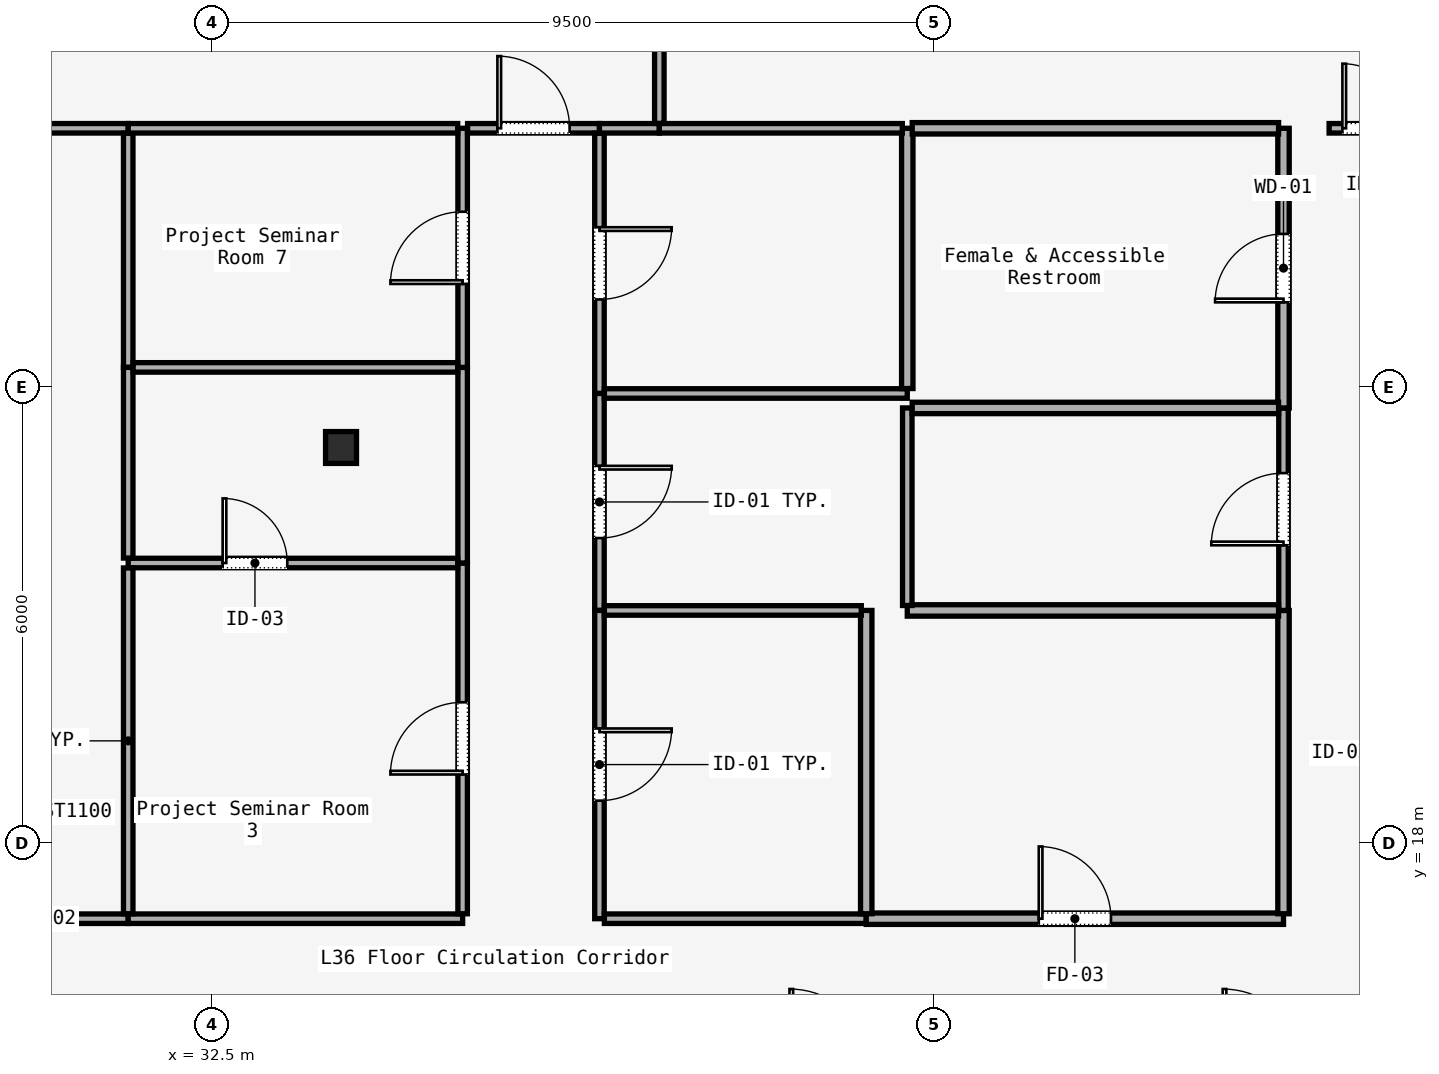
"""IFC4 building model, lengths in metres.
Left out: names, types, materials, properties, quantities, classifications, styles, units other than length and angle.
Written with IfcOpenShell. Run it as: python <this file> out.ifc"""

import sys

from ifc_helpers import new_model, si_unit, direction, frame, frame_2d, origin, origin_2d, place, context, subcontext, project, spatial, rectangle, i_section, extrude, element, fill, save


model = new_model("IFC4")
c1 = context("Model", 3, precision=1e-05, world=origin(), true_north=direction((0.0, 1.0)))
c2 = subcontext(c1, "Body", "Model", "MODEL_VIEW")
j1 = project(units=[si_unit("LENGTHUNIT", "METRE"), si_unit("PLANEANGLEUNIT", "RADIAN")], contexts=[c1])
p1 = place(None, origin())
s1 = spatial("IfcSite", under=j1, at=p1, CompositionType="ELEMENT")
p2 = place(p1, origin())
s2 = spatial("IfcBuilding", under=s1, at=p2, CompositionType="ELEMENT")
p3 = place(p2, frame((0.0, 0.0, 153.6)))
s3 = spatial("IfcBuildingStorey", under=s2, at=p3, CompositionType="ELEMENT", Elevation=153.6)
p4 = place(p3, frame((34.2, 23.2, 0.0), z_axis=(0.0, 0.0, 1.0), x_axis=(1.0, 0.0, 0.0)))
e1 = element("IfcColumn", 1, at=p4, inside=s3, PredefinedType="COLUMN", context=c2, shape_type="SweptSolid", body=[
    extrude(i_section(OverallWidth=0.407, OverallDepth=0.419, WebThickness=0.031, FlangeThickness=0.049, FilletRadius=0.015, at=origin_2d()), origin(), (0.0, 0.0, 1.0), 3.58),
])
p5 = place(p3, frame((25.665, 17.0, 0.0), z_axis=(0.0, 0.0, 1.0), x_axis=(1.0, 0.0, 0.0)))
e2 = element("IfcWall", 2, at=p5, inside=s3, PredefinedType="PARTITIONING", context=c2, shape_type="SweptSolid", body=[
    extrude(rectangle(XDim=5.735, YDim=0.125, at=frame_2d((2.867, 0.0))), origin(), (0.0, 0.0, 1.0), 3.01),
])
p6 = place(p5, frame((2.167, 0.0, 0.0)))
e3 = element("IfcOpeningElement", 3, at=p6, cuts=e2, PredefinedType="OPENING", context=c2, shape_type="SweptSolid", body=[
    extrude(rectangle(XDim=1.4, YDim=2.2, at=frame_2d((0.7, 1.1))), frame((0.0, 0.062, 0.0), z_axis=(0.0, -1.0, 0.0), x_axis=(1.0, 0.0, 0.0)), (0.0, 0.0, 1.0), 0.125),
])
p7 = place(p3, frame((31.4, 17.0, 0.0), z_axis=(0.0, 0.0, 1.0), x_axis=(1.0, 0.0, 0.0)))
e4 = element("IfcWall", 4, at=p7, inside=s3, PredefinedType="PARTITIONING", context=c2, shape_type="SweptSolid", body=[
    extrude(rectangle(XDim=4.4, YDim=0.125, at=frame_2d((2.2, 0.0))), origin(), (0.0, 0.0, 1.0), 3.01),
])
p8 = place(p3, frame((35.8, 17.065, 0.0), z_axis=(0.0, 0.0, 1.0), x_axis=(0.0, 1.0, 0.0)))
e5 = element("IfcWall", 5, at=p8, inside=s3, PredefinedType="PARTITIONING", context=c2, shape_type="SweptSolid", body=[
    extrude(rectangle(XDim=4.615, YDim=0.125, at=frame_2d((2.308, 0.0))), origin(), (0.0, 0.0, 1.0), 3.01),
])
p9 = place(p8, frame((1.833, 0.0, 0.0)))
e6 = element("IfcOpeningElement", 6, at=p9, cuts=e5, PredefinedType="OPENING", context=c2, shape_type="SweptSolid", body=[
    extrude(rectangle(XDim=0.95, YDim=2.2, at=frame_2d((0.475, 1.1))), frame((0.0, 0.062, 0.0), z_axis=(0.0, -1.0, 0.0), x_axis=(1.0, 0.0, 0.0)), (0.0, 0.0, 1.0), 0.125),
])
p10 = place(p3, frame((35.8, 21.68, 0.0), z_axis=(0.0, 0.0, 1.0), x_axis=(0.0, 1.0, 0.0)))
e7 = element("IfcWall", 7, at=p10, inside=s3, PredefinedType="PARTITIONING", context=c2, shape_type="SweptSolid", body=[
    extrude(rectangle(XDim=2.574, YDim=0.125, at=frame_2d((1.287, 0.0))), origin(), (0.0, 0.0, 1.0), 3.01),
])
p11 = place(p3, frame((35.8, 24.254, 0.0), z_axis=(0.0, 0.0, 1.0), x_axis=(0.0, 1.0, 0.0)))
e8 = element("IfcWall", 8, at=p11, inside=s3, PredefinedType="PARTITIONING", context=c2, shape_type="SweptSolid", body=[
    extrude(rectangle(XDim=3.146, YDim=0.125, at=frame_2d((1.573, 0.0))), origin(), (0.0, 0.0, 1.0), 3.01),
])
p12 = place(p11, frame((1.098, 0.0, 0.0)))
e9 = element("IfcOpeningElement", 9, at=p12, cuts=e8, PredefinedType="OPENING", context=c2, shape_type="SweptSolid", body=[
    extrude(rectangle(XDim=0.95, YDim=2.2, at=frame_2d((0.475, 1.1))), frame((0.0, 0.062, 0.0), z_axis=(0.0, -1.0, 0.0), x_axis=(1.0, 0.0, 0.0)), (0.0, 0.0, 1.0), 0.125),
])
p13 = place(p3, frame((35.865, 27.4, 0.0), z_axis=(0.0, 0.0, 1.0), x_axis=(1.0, 0.0, 0.0)))
e10 = element("IfcWall", 10, at=p13, inside=s3, PredefinedType="PARTITIONING", context=c2, shape_type="SweptSolid", body=[
    extrude(rectangle(XDim=1.735, YDim=0.125, at=frame_2d((0.868, 0.0))), origin(), (0.0, 0.0, 1.0), 3.01),
])
p14 = place(p13, frame((0.393, 0.0, 0.0)))
e11 = element("IfcOpeningElement", 11, at=p14, cuts=e10, PredefinedType="OPENING", context=c2, shape_type="SweptSolid", body=[
    extrude(rectangle(XDim=0.95, YDim=2.2, at=frame_2d((0.475, 1.1))), frame((0.0, 0.062, 0.0), z_axis=(0.0, -1.0, 0.0), x_axis=(1.0, 0.0, 0.0)), (0.0, 0.0, 1.0), 0.125),
])
p15 = place(p3, frame((37.6, 27.335, 0.0), z_axis=(0.0, 0.0, 1.0), x_axis=(0.0, -1.0, 0.0)))
e12 = element("IfcWall", 12, at=p15, inside=s3, PredefinedType="PARTITIONING", context=c2, shape_type="SweptSolid", body=[
    extrude(rectangle(XDim=3.424, YDim=0.125, at=frame_2d((1.712, 0.0))), origin(), (0.0, 0.0, 1.0), 3.01),
])
p16 = place(p15, frame((1.237, 0.0, 0.0)))
e13 = element("IfcOpeningElement", 13, at=p16, cuts=e12, PredefinedType="OPENING", context=c2, shape_type="SweptSolid", body=[
    extrude(rectangle(XDim=0.95, YDim=2.2, at=frame_2d((0.475, 1.1))), frame((0.0, 0.062, 0.0), z_axis=(0.0, -1.0, 0.0), x_axis=(1.0, 0.0, 0.0)), (0.0, 0.0, 1.0), 0.125),
])
p17 = place(p3, frame((37.6, 23.911, 0.0), z_axis=(0.0, 0.0, 1.0), x_axis=(0.0, -1.0, 0.0)))
e14 = element("IfcWall", 14, at=p17, inside=s3, PredefinedType="PARTITIONING", context=c2, shape_type="SweptSolid", body=[
    extrude(rectangle(XDim=2.855, YDim=0.125, at=frame_2d((1.427, 0.0))), origin(), (0.0, 0.0, 1.0), 3.01),
])
p18 = place(p17, frame((0.952, 0.0, 0.0)))
e15 = element("IfcOpeningElement", 15, at=p18, cuts=e14, PredefinedType="OPENING", context=c2, shape_type="SweptSolid", body=[
    extrude(rectangle(XDim=0.95, YDim=2.2, at=frame_2d((0.475, 1.1))), frame((0.0, 0.062, 0.0), z_axis=(0.0, -1.0, 0.0), x_axis=(1.0, 0.0, 0.0)), (0.0, 0.0, 1.0), 0.125),
])
p19 = place(p3, frame((37.6, 21.056, 0.0), z_axis=(0.0, 0.0, 1.0), x_axis=(0.0, -1.0, 0.0)))
e16 = element("IfcWall", 16, at=p19, inside=s3, PredefinedType="PARTITIONING", context=c2, shape_type="SweptSolid", body=[
    extrude(rectangle(XDim=4.056, YDim=0.125, at=frame_2d((2.028, 0.0))), origin(), (0.0, 0.0, 1.0), 3.01),
])
p20 = place(p19, frame((1.553, 0.0, 0.0)))
e17 = element("IfcOpeningElement", 17, at=p20, cuts=e16, PredefinedType="OPENING", context=c2, shape_type="SweptSolid", body=[
    extrude(rectangle(XDim=0.95, YDim=2.2, at=frame_2d((0.475, 1.1))), frame((0.0, 0.062, 0.0), z_axis=(0.0, -1.0, 0.0), x_axis=(1.0, 0.0, 0.0)), (0.0, 0.0, 1.0), 0.125),
])
p21 = place(p3, frame((37.665, 17.0, 0.0), z_axis=(0.0, 0.0, 1.0), x_axis=(1.0, 0.0, 0.0)))
e18 = element("IfcWall", 18, at=p21, inside=s3, PredefinedType="PARTITIONING", context=c2, shape_type="SweptSolid", body=[
    extrude(rectangle(XDim=3.445, YDim=0.125, at=frame_2d((1.723, 0.0))), origin(), (0.0, 0.0, 1.0), 3.01),
])
p22 = place(p3, frame((41.11, 17.0, 0.0), z_axis=(0.0, 0.0, 1.0), x_axis=(1.0, 0.0, 0.0)))
e19 = element("IfcWall", 19, at=p22, inside=s3, PredefinedType="PARTITIONING", context=c2, shape_type="SweptSolid", body=[
    extrude(rectangle(XDim=5.49, YDim=0.15, at=frame_2d((2.745, 0.0))), origin(), (0.0, 0.0, 1.0), 3.01),
])
p23 = place(p22, frame((2.27, 0.0, 0.0)))
e20 = element("IfcOpeningElement", 20, at=p23, cuts=e19, PredefinedType="OPENING", context=c2, shape_type="SweptSolid", body=[
    extrude(rectangle(XDim=0.95, YDim=2.2, at=frame_2d((0.475, 1.1))), frame((0.0, 0.075, 0.0), z_axis=(0.0, -1.0, 0.0), x_axis=(1.0, 0.0, 0.0)), (0.0, 0.0, 1.0), 0.15),
])
p24 = place(p3, frame((46.6, 17.065, 0.0), z_axis=(0.0, 0.0, 1.0), x_axis=(0.0, 1.0, 0.0)))
e21 = element("IfcWall", 21, at=p24, inside=s3, PredefinedType="PARTITIONING", context=c2, shape_type="SweptSolid", body=[
    extrude(rectangle(XDim=3.991, YDim=0.15, at=frame_2d((1.996, 0.0))), origin(), (0.0, 0.0, 1.0), 3.01),
])
p25 = place(p3, frame((46.6, 21.056, 0.0), z_axis=(0.0, 0.0, 1.0), x_axis=(0.0, 1.0, 0.0)))
e22 = element("IfcWall", 22, at=p25, inside=s3, PredefinedType="PARTITIONING", context=c2, shape_type="SweptSolid", body=[
    extrude(rectangle(XDim=2.665, YDim=0.125, at=frame_2d((1.332, 0.0))), origin(), (0.0, 0.0, 1.0), 3.01),
])
p26 = place(p25, frame((0.857, 0.0, 0.0)))
e23 = element("IfcOpeningElement", 23, at=p26, cuts=e22, PredefinedType="OPENING", context=c2, shape_type="SweptSolid", body=[
    extrude(rectangle(XDim=0.95, YDim=2.2, at=frame_2d((0.475, 1.1))), frame((0.0, 0.062, 0.0), z_axis=(0.0, -1.0, 0.0), x_axis=(1.0, 0.0, 0.0)), (0.0, 0.0, 1.0), 0.125),
])
p27 = place(p3, frame((46.6, 23.72, 0.0), z_axis=(0.0, 0.0, 1.0), x_axis=(0.0, 1.0, 0.0)))
e24 = element("IfcWall", 24, at=p27, inside=s3, PredefinedType="PARTITIONING", context=c2, shape_type="SweptSolid", body=[
    extrude(rectangle(XDim=3.679, YDim=0.15, at=frame_2d((1.84, 0.0))), origin(), (0.0, 0.0, 1.0), 3.01),
])
p28 = place(p27, frame((1.39, 0.0, 0.0)))
e25 = element("IfcOpeningElement", 25, at=p28, cuts=e24, PredefinedType="OPENING", context=c2, shape_type="SweptSolid", body=[
    extrude(rectangle(XDim=0.9, YDim=2.15, at=frame_2d((0.45, 1.075))), frame((0.0, 0.075, 0.0), z_axis=(0.0, -1.0, 0.0), x_axis=(1.0, 0.0, 0.0)), (0.0, 0.0, 1.0), 0.15),
])
p29 = place(p3, frame((47.2, 27.4, 0.0), z_axis=(0.0, 0.0, 1.0), x_axis=(1.0, 0.0, 0.0)))
e26 = element("IfcWall", 26, at=p29, inside=s3, PredefinedType="PARTITIONING", context=c2, shape_type="SweptSolid", body=[
    extrude(rectangle(XDim=1.2, YDim=0.125, at=frame_2d((0.6, 0.0))), origin(), (0.0, 0.0, 1.0), 3.01),
])
p30 = place(p29, frame((0.175, 0.0, 0.0)))
e27 = element("IfcOpeningElement", 27, at=p30, cuts=e26, PredefinedType="OPENING", context=c2, shape_type="SweptSolid", body=[
    extrude(rectangle(XDim=0.85, YDim=2.15, at=frame_2d((0.425, 1.075))), frame((0.0, 0.062, 0.0), z_axis=(0.0, -1.0, 0.0), x_axis=(1.0, 0.0, 0.0)), (0.0, 0.0, 1.0), 0.125),
])
p31 = place(p3, frame((41.11, 21.056, 0.0), z_axis=(0.0, 0.0, 1.0), x_axis=(0.0, -1.0, 0.0)))
e28 = element("IfcWall", 28, at=p31, inside=s3, PredefinedType="PARTITIONING", context=c2, shape_type="SweptSolid", body=[
    extrude(rectangle(XDim=3.991, YDim=0.15, at=frame_2d((1.996, 0.0))), origin(), (0.0, 0.0, 1.0), 3.01),
])
p32 = place(p3, frame((37.665, 21.056, 0.0), z_axis=(0.0, 0.0, 1.0), x_axis=(1.0, 0.0, 0.0)))
e29 = element("IfcWall", 29, at=p32, inside=s3, PredefinedType="PARTITIONING", context=c2, shape_type="SweptSolid", body=[
    extrude(rectangle(XDim=3.38, YDim=0.125, at=frame_2d((1.69, 0.0))), origin(), (0.0, 0.0, 1.0), 3.01),
])
p33 = place(p3, frame((41.65, 21.056, 0.0), z_axis=(0.0, 0.0, 1.0), x_axis=(1.0, 0.0, 0.0)))
e30 = element("IfcWall", 30, at=p33, inside=s3, PredefinedType="PARTITIONING", context=c2, shape_type="SweptSolid", body=[
    extrude(rectangle(XDim=4.885, YDim=0.15, at=frame_2d((2.442, 0.0))), origin(), (0.0, 0.0, 1.0), 3.01),
])
p34 = place(p3, frame((31.4, 21.68, 0.0), z_axis=(0.0, 0.0, 1.0), x_axis=(1.0, 0.0, 0.0)))
e31 = element("IfcWall", 31, at=p34, inside=s3, PredefinedType="PARTITIONING", context=c2, shape_type="SweptSolid", body=[
    extrude(rectangle(XDim=4.335, YDim=0.125, at=frame_2d((2.167, 0.0))), origin(), (0.0, 0.0, 1.0), 3.01),
])
p35 = place(p34, frame((1.242, 0.0, 0.0)))
e32 = element("IfcOpeningElement", 32, at=p35, cuts=e31, PredefinedType="OPENING", context=c2, shape_type="SweptSolid", body=[
    extrude(rectangle(XDim=0.85, YDim=2.15, at=frame_2d((0.425, 1.075))), frame((0.0, 0.062, 0.0), z_axis=(0.0, -1.0, 0.0), x_axis=(1.0, 0.0, 0.0)), (0.0, 0.0, 1.0), 0.125),
])
p36 = place(p3, frame((31.4, 17.065, 0.0), z_axis=(0.0, 0.0, 1.0), x_axis=(0.0, 1.0, 0.0)))
e33 = element("IfcWall", 33, at=p36, inside=s3, PredefinedType="PARTITIONING", context=c2, shape_type="SweptSolid", body=[
    extrude(rectangle(XDim=4.55, YDim=0.125, at=frame_2d((2.275, 0.0))), origin(), (0.0, 0.0, 1.0), 3.01),
])
p37 = place(p3, frame((25.581, 27.4, 0.0), z_axis=(0.0, 0.0, 1.0), x_axis=(1.0, 0.0, 0.0)))
e34 = element("IfcWall", 34, at=p37, inside=s3, PredefinedType="PARTITIONING", context=c2, shape_type="SweptSolid", body=[
    extrude(rectangle(XDim=5.819, YDim=0.125, at=frame_2d((2.91, 0.0))), origin(), (0.0, 0.0, 1.0), 3.01),
])
p38 = place(p3, frame((31.4, 27.335, 0.0), z_axis=(0.0, 0.0, 1.0), x_axis=(0.0, -1.0, 0.0)))
e35 = element("IfcWall", 35, at=p38, inside=s3, PredefinedType="PARTITIONING", context=c2, shape_type="SweptSolid", body=[
    extrude(rectangle(XDim=3.081, YDim=0.125, at=frame_2d((1.541, 0.0))), origin(), (0.0, 0.0, 1.0), 3.01),
])
p39 = place(p3, frame((31.4, 24.254, 0.0), z_axis=(0.0, 0.0, 1.0), x_axis=(0.0, -1.0, 0.0)))
e36 = element("IfcWall", 36, at=p39, inside=s3, PredefinedType="PARTITIONING", context=c2, shape_type="SweptSolid", body=[
    extrude(rectangle(XDim=2.509, YDim=0.125, at=frame_2d((1.254, 0.0))), origin(), (0.0, 0.0, 1.0), 3.01),
])
p40 = place(p3, frame((41.65, 21.121, 0.0), z_axis=(0.0, 0.0, 1.0), x_axis=(0.0, 1.0, 0.0)))
e37 = element("IfcWall", 37, at=p40, inside=s3, PredefinedType="PARTITIONING", context=c2, shape_type="SweptSolid", body=[
    extrude(rectangle(XDim=2.599, YDim=0.125, at=frame_2d((1.3, 0.0))), origin(), (0.0, 0.0, 1.0), 3.01),
])
p41 = place(p3, frame((41.715, 23.72, 0.0), z_axis=(0.0, 0.0, 1.0), x_axis=(1.0, 0.0, 0.0)))
e38 = element("IfcWall", 38, at=p41, inside=s3, PredefinedType="PARTITIONING", context=c2, shape_type="SweptSolid", body=[
    extrude(rectangle(XDim=4.82, YDim=0.15, at=frame_2d((2.41, 0.0))), origin(), (0.0, 0.0, 1.0), 3.01),
])
p42 = place(p3, frame((37.665, 23.911, 0.0), z_axis=(0.0, 0.0, 1.0), x_axis=(1.0, 0.0, 0.0)))
e39 = element("IfcWall", 39, at=p42, inside=s3, PredefinedType="PARTITIONING", context=c2, shape_type="SweptSolid", body=[
    extrude(rectangle(XDim=3.985, YDim=0.125, at=frame_2d((1.992, 0.0))), origin(), (0.0, 0.0, 1.0), 3.01),
])
p43 = place(p3, frame((31.465, 24.254, 0.0), z_axis=(0.0, 0.0, 1.0), x_axis=(1.0, 0.0, 0.0)))
e40 = element("IfcWall", 40, at=p43, inside=s3, PredefinedType="PARTITIONING", context=c2, shape_type="SweptSolid", body=[
    extrude(rectangle(XDim=4.27, YDim=0.125, at=frame_2d((2.135, 0.0))), origin(), (0.0, 0.0, 1.0), 3.01),
])
p44 = place(p3, frame((41.65, 23.976, 0.0), z_axis=(0.0, 0.0, 1.0), x_axis=(0.0, 1.0, 0.0)))
e41 = element("IfcWall", 41, at=p44, inside=s3, PredefinedType="PARTITIONING", context=c2, shape_type="SweptSolid", body=[
    extrude(rectangle(XDim=3.424, YDim=0.15, at=frame_2d((1.712, 0.0))), origin(), (0.0, 0.0, 1.0), 3.01),
])
p45 = place(p3, frame((41.715, 27.4, 0.0), z_axis=(0.0, 0.0, 1.0), x_axis=(1.0, 0.0, 0.0)))
e42 = element("IfcWall", 42, at=p45, inside=s3, PredefinedType="PARTITIONING", context=c2, shape_type="SweptSolid", body=[
    extrude(rectangle(XDim=4.82, YDim=0.15, at=frame_2d((2.41, 0.0))), origin(), (0.0, 0.0, 1.0), 3.01),
])
p46 = place(p3, frame((37.6, 27.4, 0.0), z_axis=(0.0, 0.0, 1.0), x_axis=(1.0, 0.0, 0.0)))
e43 = element("IfcWall", 43, at=p46, inside=s3, PredefinedType="PARTITIONING", context=c2, shape_type="SweptSolid", body=[
    extrude(rectangle(XDim=0.788, YDim=0.125, at=frame_2d((0.394, 0.0))), origin(), (0.0, 0.0, 1.0), 3.01),
])
p47 = place(p3, frame((38.388, 27.4, 0.0), z_axis=(0.0, 0.0, 1.0), x_axis=(1.0, 0.0, 0.0)))
e44 = element("IfcWall", 44, at=p47, inside=s3, PredefinedType="PARTITIONING", context=c2, shape_type="SweptSolid", body=[
    extrude(rectangle(XDim=3.197, YDim=0.125, at=frame_2d((1.599, 0.0))), origin(), (0.0, 0.0, 1.0), 3.01),
])
p48 = place(p3, frame((31.4, 27.4, 0.0), z_axis=(0.0, 0.0, 1.0), x_axis=(1.0, 0.0, 0.0)))
e45 = element("IfcWall", 45, at=p48, inside=s3, PredefinedType="PARTITIONING", context=c2, shape_type="SweptSolid", body=[
    extrude(rectangle(XDim=4.335, YDim=0.125, at=frame_2d((2.167, 0.0))), origin(), (0.0, 0.0, 1.0), 3.01),
])
p49 = place(p3, frame((38.388, 46.154, 0.0), z_axis=(0.0, 0.0, 1.0), x_axis=(0.0, -1.0, 0.0)))
e46 = element("IfcWall", 46, at=p49, inside=s3, PredefinedType="PARTITIONING", context=c2, shape_type="SweptSolid", body=[
    extrude(rectangle(XDim=18.689, YDim=0.125, at=frame_2d((9.344, 0.0))), origin(), (0.0, 0.0, 1.0), 3.01),
])
p50 = place(p20, origin())
e47 = element("IfcDoor", 47, at=p50, inside=s3, OperationType="SINGLE_SWING_LEFT", PredefinedType="DOOR", context=c2, shape_type="SweptSolid", body=[
    extrude(rectangle(XDim=0.95, YDim=2.2, at=frame_2d((0.475, 1.1))), frame((0.0, 0.025, 0.0), z_axis=(0.0, -1.0, 0.0), x_axis=(1.0, 0.0, 0.0)), (0.0, 0.0, 1.0), 0.05),
])
fill(e17, e47)
p51 = place(p23, origin())
e48 = element("IfcDoor", 48, at=p51, inside=s3, OperationType="SINGLE_SWING_RIGHT", PredefinedType="DOOR", context=c2, shape_type="SweptSolid", body=[
    extrude(rectangle(XDim=0.95, YDim=2.2, at=frame_2d((0.475, 1.1))), frame((0.0, 0.025, 0.0), z_axis=(0.0, -1.0, 0.0), x_axis=(1.0, 0.0, 0.0)), (0.0, 0.0, 1.0), 0.05),
])
fill(e20, e48)
p52 = place(p9, origin())
e49 = element("IfcDoor", 49, at=p52, inside=s3, OperationType="SINGLE_SWING_LEFT", PredefinedType="DOOR", context=c2, shape_type="SweptSolid", body=[
    extrude(rectangle(XDim=0.95, YDim=2.2, at=frame_2d((0.475, 1.1))), frame((0.0, 0.025, 0.0), z_axis=(0.0, -1.0, 0.0), x_axis=(1.0, 0.0, 0.0)), (0.0, 0.0, 1.0), 0.05),
])
fill(e6, e49)
p53 = place(p26, origin())
e50 = element("IfcDoor", 50, at=p53, inside=s3, OperationType="SINGLE_SWING_RIGHT", PredefinedType="DOOR", context=c2, shape_type="SweptSolid", body=[
    extrude(rectangle(XDim=0.95, YDim=2.2, at=frame_2d((0.475, 1.1))), frame((0.0, 0.025, 0.0), z_axis=(0.0, -1.0, 0.0), x_axis=(1.0, 0.0, 0.0)), (0.0, 0.0, 1.0), 0.05),
])
fill(e23, e50)
p54 = place(p18, origin())
e51 = element("IfcDoor", 51, at=p54, inside=s3, OperationType="SINGLE_SWING_LEFT", PredefinedType="DOOR", context=c2, shape_type="SweptSolid", body=[
    extrude(rectangle(XDim=0.95, YDim=2.2, at=frame_2d((0.475, 1.1))), frame((0.0, 0.025, 0.0), z_axis=(0.0, -1.0, 0.0), x_axis=(1.0, 0.0, 0.0)), (0.0, 0.0, 1.0), 0.05),
])
fill(e15, e51)
p55 = place(p35, origin())
e52 = element("IfcDoor", 52, at=p55, inside=s3, OperationType="SINGLE_SWING_LEFT", PredefinedType="DOOR", context=c2, shape_type="SweptSolid", body=[
    extrude(rectangle(XDim=0.85, YDim=2.15, at=frame_2d((0.425, 1.075))), frame((0.0, 0.025, 0.0), z_axis=(0.0, -1.0, 0.0), x_axis=(1.0, 0.0, 0.0)), (0.0, 0.0, 1.0), 0.05),
])
fill(e32, e52)
p56 = place(p28, origin())
e53 = element("IfcDoor", 53, at=p56, inside=s3, OperationType="SINGLE_SWING_RIGHT", PredefinedType="DOOR", context=c2, shape_type="SweptSolid", body=[
    extrude(rectangle(XDim=0.9, YDim=2.15, at=frame_2d((0.45, 1.075))), frame((0.0, 0.025, 0.0), z_axis=(0.0, -1.0, 0.0), x_axis=(1.0, 0.0, 0.0)), (0.0, 0.0, 1.0), 0.05),
])
fill(e25, e53)
p57 = place(p16, origin())
e54 = element("IfcDoor", 54, at=p57, inside=s3, OperationType="SINGLE_SWING_RIGHT", PredefinedType="DOOR", context=c2, shape_type="SweptSolid", body=[
    extrude(rectangle(XDim=0.95, YDim=2.2, at=frame_2d((0.475, 1.1))), frame((0.0, 0.025, 0.0), z_axis=(0.0, -1.0, 0.0), x_axis=(1.0, 0.0, 0.0)), (0.0, 0.0, 1.0), 0.05),
])
fill(e13, e54)
p58 = place(p12, origin())
e55 = element("IfcDoor", 55, at=p58, inside=s3, OperationType="SINGLE_SWING_LEFT", PredefinedType="DOOR", context=c2, shape_type="SweptSolid", body=[
    extrude(rectangle(XDim=0.95, YDim=2.2, at=frame_2d((0.475, 1.1))), frame((0.0, 0.025, 0.0), z_axis=(0.0, -1.0, 0.0), x_axis=(1.0, 0.0, 0.0)), (0.0, 0.0, 1.0), 0.05),
])
fill(e9, e55)
p59 = place(p14, origin())
e56 = element("IfcDoor", 56, at=p59, inside=s3, OperationType="SINGLE_SWING_RIGHT", PredefinedType="DOOR", context=c2, shape_type="SweptSolid", body=[
    extrude(rectangle(XDim=0.95, YDim=2.2, at=frame_2d((0.475, 1.1))), frame((0.0, 0.025, 0.0), z_axis=(0.0, -1.0, 0.0), x_axis=(1.0, 0.0, 0.0)), (0.0, 0.0, 1.0), 0.05),
])
fill(e11, e56)
p60 = place(p30, origin())
e57 = element("IfcDoor", 57, at=p60, inside=s3, OperationType="SINGLE_SWING_LEFT", PredefinedType="DOOR", context=c2, shape_type="SweptSolid", body=[
    extrude(rectangle(XDim=0.85, YDim=2.15, at=frame_2d((0.425, 1.075))), frame((0.0, 0.025, 0.0), z_axis=(0.0, -1.0, 0.0), x_axis=(1.0, 0.0, 0.0)), (0.0, 0.0, 1.0), 0.05),
])
fill(e27, e57)
save(model, sys.argv[1])
